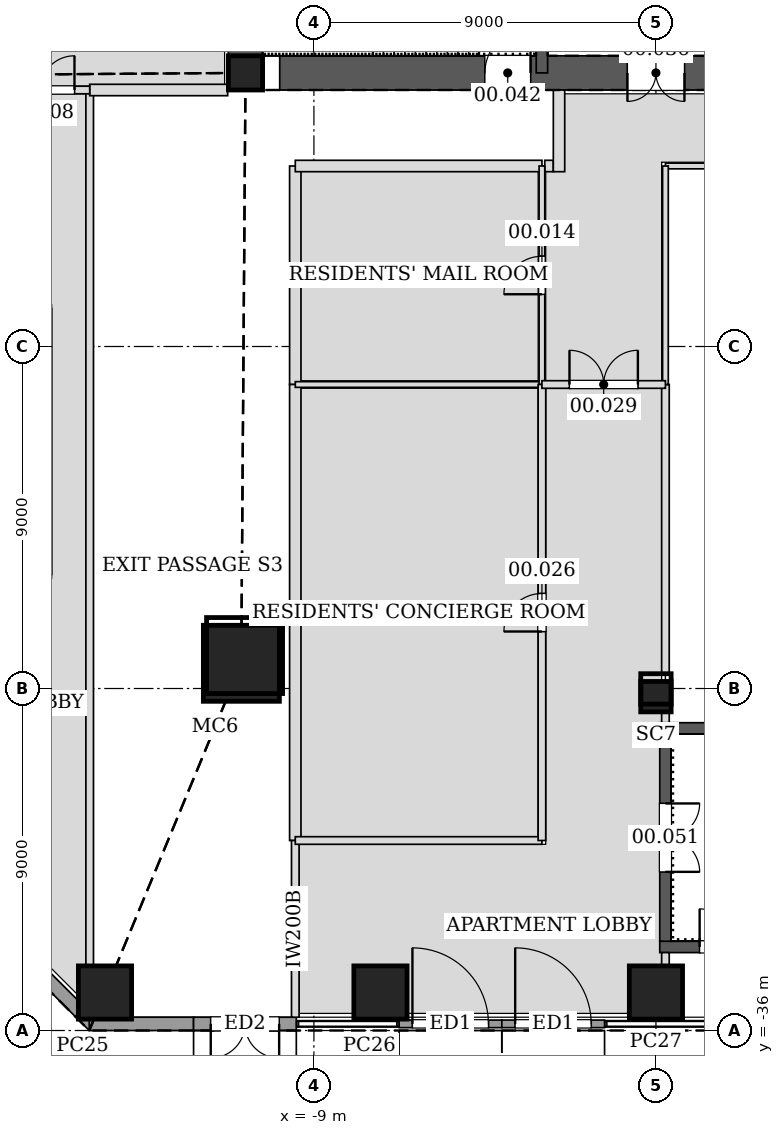
"""IFC4 building model, lengths in metres.
Left out: names, types, materials, properties, quantities, classifications, styles, units other than length and angle.
Written with IfcOpenShell. Run it as: python <this file> out.ifc"""

import sys

from ifc_helpers import new_model, si_unit, direction, frame, frame_2d, origin, origin_2d, place, context, subcontext, project, spatial, rectangle, hollow_rectangle, extrude, element, fill, save


model = new_model("IFC4")
c1 = context("Model", 3, precision=1e-05, world=origin(), true_north=direction((0.0, 1.0)))
c2 = subcontext(c1, "Body", "Model", "MODEL_VIEW")
j1 = project(units=[si_unit("LENGTHUNIT", "METRE"), si_unit("PLANEANGLEUNIT", "RADIAN")], contexts=[c1])
p1 = place(None, origin())
s1 = spatial("IfcSite", under=j1, at=p1, CompositionType="ELEMENT")
p2 = place(p1, origin())
s2 = spatial("IfcBuilding", under=s1, at=p2, CompositionType="ELEMENT")
p3 = place(p2, origin())
s3 = spatial("IfcBuildingStorey", under=s2, at=p3, CompositionType="ELEMENT", Elevation=0.0)
p4 = place(p3, frame((-10.909, -26.336, 0.0), z_axis=(0.011726897842, 0.028266568786, 0.999531630793), x_axis=(-0.923665637433, 0.383199413132, 0.0)))
e1 = element("IfcColumn", 1, at=p4, inside=s3, PredefinedType="COLUMN", context=c2, shape_type="SweptSolid", body=[
    extrude(hollow_rectangle(XDim=2.0, YDim=2.0, WallThickness=0.09, at=origin_2d()), origin(), (0.0, 0.0, 1.0), 7.203),
])
p5 = place(p3, frame((0.0, -27.215, 0.0), z_axis=(0.0, 0.028268512598, 0.999600365744), x_axis=(-1.0, 0.0, 0.0)))
e2 = element("IfcColumn", 2, at=p5, inside=s3, PredefinedType="COLUMN", context=c2, shape_type="SweptSolid", body=[
    extrude(hollow_rectangle(XDim=0.8, YDim=0.8, WallThickness=0.05, at=origin_2d()), origin(), (0.0, 0.0, 1.0), 7.203),
])
for number, where, z_axis, x_axis in (
    (3, (-14.498, -35.0, 0.0), (0.0, 0.0, 1.0), (1.0, 0.0, 0.0)),
    (4, (-7.249, -35.0, 0.0), (0.0, 0.0, 1.0), (1.0, 0.0, 0.0)),
    (5, (0.0, -35.0, 0.0), (0.0, 0.0, 1.0), (1.0, 0.0, 0.0)),
):
    element("IfcColumn", number, at=place(p3, frame(where, z_axis=z_axis, x_axis=x_axis)), inside=s3, PredefinedType="COLUMN", context=c2, shape_type="SweptSolid", body=[
        extrude(rectangle(XDim=1.4, YDim=1.4, at=origin_2d()), origin(), (0.0, 0.0, 1.0), 7.2),
    ])
p6 = place(p3, frame((-10.8, -10.8, 0.0), z_axis=(0.0, 0.0, 1.0), x_axis=(1.0, 0.0, 0.0)))
e6 = element("IfcColumn", 6, at=p6, inside=s3, PredefinedType="COLUMN", context=c2, shape_type="SweptSolid", body=[
    extrude(hollow_rectangle(XDim=0.9, YDim=0.9, WallThickness=0.06, at=origin_2d()), origin(), (0.0, 0.0, 1.0), 7.2),
])
p7 = place(p3, frame((-10.8, -10.8, 0.0), z_axis=(0.0, 0.0, 1.0), x_axis=(1.0, 0.0, 0.0)))
e7 = element("IfcWall", 7, at=p7, inside=s3, PredefinedType="SOLIDWALL", context=c2, shape_type="SweptSolid", body=[
    extrude(rectangle(XDim=21.6, YDim=0.9, at=frame_2d((10.8, 0.0))), origin(), (0.0, 0.0, 1.0), 7.2),
])
p8 = place(p7, frame((10.05, 0.0, 0.0)))
e8 = element("IfcOpeningElement", 8, at=p8, cuts=e7, PredefinedType="OPENING", context=c2, shape_type="SweptSolid", body=[
    extrude(rectangle(XDim=1.5, YDim=2.1, at=frame_2d((0.75, 1.05))), frame((0.0, 0.46, 0.0), z_axis=(0.0, -1.0, 0.0), x_axis=(1.0, 0.0, 0.0)), (0.0, 0.0, 1.0), 0.92),
])
p9 = place(p7, frame((6.3, 0.0, 0.0)))
e9 = element("IfcOpeningElement", 9, at=p9, cuts=e7, PredefinedType="OPENING", context=c2, shape_type="SweptSolid", body=[
    extrude(rectangle(XDim=1.2, YDim=2.1, at=frame_2d((0.6, 1.05))), frame((0.0, 0.46, 0.0), z_axis=(0.0, -1.0, 0.0), x_axis=(1.0, 0.0, 0.0)), (0.0, 0.0, 1.0), 0.92),
])
p10 = place(p7, frame((17.1, 0.0, 0.0)))
e10 = element("IfcOpeningElement", 10, at=p10, cuts=e7, PredefinedType="OPENING", context=c2, shape_type="SweptSolid", body=[
    extrude(rectangle(XDim=0.9, YDim=2.1, at=frame_2d((0.45, 1.05))), frame((0.0, 0.46, 0.0), z_axis=(0.0, -1.0, 0.0), x_axis=(1.0, 0.0, 0.0)), (0.0, 0.0, 1.0), 0.92),
])
p11 = place(p3, frame((-10.8, 10.8, 0.0), z_axis=(0.0, 0.0, 1.0), x_axis=(0.0, -1.0, 0.0)))
e11 = element("IfcWall", 11, at=p11, inside=s3, PredefinedType="SOLIDWALL", context=c2, shape_type="SweptSolid", body=[
    extrude(rectangle(XDim=21.6, YDim=0.9, at=frame_2d((10.8, 0.0))), origin(), (0.0, 0.0, 1.0), 7.2),
])
p12 = place(p11, frame((8.7, 0.0, 0.0)))
e12 = element("IfcOpeningElement", 12, at=p12, cuts=e11, PredefinedType="OPENING", context=c2, shape_type="SweptSolid", body=[
    extrude(rectangle(XDim=1.2, YDim=2.1, at=frame_2d((0.6, 1.05))), frame((0.0, 0.46, 0.0), z_axis=(0.0, -1.0, 0.0), x_axis=(1.0, 0.0, 0.0)), (0.0, 0.0, 1.0), 0.92),
])
p13 = place(p11, frame((11.7, 0.0, 0.0)))
e13 = element("IfcOpeningElement", 13, at=p13, cuts=e11, PredefinedType="OPENING", context=c2, shape_type="SweptSolid", body=[
    extrude(rectangle(XDim=1.2, YDim=2.1, at=frame_2d((0.6, 1.05))), frame((0.0, 0.46, 0.0), z_axis=(0.0, -1.0, 0.0), x_axis=(1.0, 0.0, 0.0)), (0.0, 0.0, 1.0), 0.92),
])
p14 = place(p3, frame((-3.0, -6.0, 0.0), z_axis=(0.0, 0.0, 1.0), x_axis=(0.0, -1.0, 0.0)))
e14 = element("IfcWall", 14, at=p14, inside=s3, PredefinedType="SOLIDWALL", context=c2, shape_type="SweptSolid", body=[
    extrude(rectangle(XDim=4.8, YDim=0.3, at=frame_2d((2.4, 0.0))), origin(), (0.0, 0.0, 1.0), 7.2),
])
p15 = place(p14, frame((1.65, 0.0, 0.0)))
e15 = element("IfcOpeningElement", 15, at=p15, cuts=e14, PredefinedType="OPENING", context=c2, shape_type="SweptSolid", body=[
    extrude(rectangle(XDim=1.2, YDim=2.1, at=frame_2d((0.6, 1.05))), frame((0.0, 0.16, 0.0), z_axis=(0.0, -1.0, 0.0), x_axis=(1.0, 0.0, 0.0)), (0.0, 0.0, 1.0), 0.32),
])
p16 = place(p3, frame((0.1, -33.8, 0.0), z_axis=(0.0, 0.0, 1.0), x_axis=(1.0, 0.0, 0.0)))
e16 = element("IfcWall", 16, at=p16, inside=s3, PredefinedType="SOLIDWALL", context=c2, shape_type="SweptSolid", body=[
    extrude(rectangle(XDim=10.2, YDim=0.3, at=frame_2d((5.1, 0.0))), origin(), (0.0, 0.0, 1.0), 7.2),
])
p17 = place(p16, frame((1.05, 0.0, 0.0)))
e17 = element("IfcOpeningElement", 17, at=p17, cuts=e16, PredefinedType="OPENING", context=c2, shape_type="SweptSolid", body=[
    extrude(rectangle(XDim=1.0, YDim=2.1, at=frame_2d((0.5, 1.05))), frame((0.0, 0.16, 0.0), z_axis=(0.0, -1.0, 0.0), x_axis=(1.0, 0.0, 0.0)), (0.0, 0.0, 1.0), 0.32),
])
p18 = place(p3, frame((10.3, -28.05, 0.0), z_axis=(0.0, 0.0, 1.0), x_axis=(-1.0, 0.0, 0.0)))
e18 = element("IfcWall", 18, at=p18, inside=s3, PredefinedType="SOLIDWALL", context=c2, shape_type="SweptSolid", body=[
    extrude(rectangle(XDim=10.2, YDim=0.3, at=frame_2d((5.1, 0.0))), origin(), (0.0, 0.0, 1.0), 7.2),
])
p19 = place(p3, frame((0.25, -28.2, 0.0), z_axis=(0.0, 0.0, 1.0), x_axis=(0.0, -1.0, 0.0)))
e19 = element("IfcWall", 19, at=p19, inside=s3, PredefinedType="SOLIDWALL", context=c2, shape_type="SweptSolid", body=[
    extrude(rectangle(XDim=5.45, YDim=0.3, at=frame_2d((2.725, 0.0))), origin(), (0.0, 0.0, 1.0), 7.2),
])
p20 = place(p19, frame((1.825, 0.0, 0.0)))
e20 = element("IfcOpeningElement", 20, at=p20, cuts=e19, PredefinedType="OPENING", context=c2, shape_type="SweptSolid", body=[
    extrude(rectangle(XDim=1.8, YDim=2.1, at=frame_2d((0.9, 1.05))), frame((0.0, 0.16, 0.0), z_axis=(0.0, -1.0, 0.0), x_axis=(1.0, 0.0, 0.0)), (0.0, 0.0, 1.0), 0.32),
])
for number, where, z_axis, x_axis in (
    (21, (-16.729, -33.935, 0.0), (0.0, 0.0, 1.0), (0.707, -0.707, 0.0)),
    (22, (-14.912, -35.825, 0.0), (0.0, 0.0, 1.0), (1.0, 0.0, 0.0)),
):
    element("IfcWall", number, at=place(p3, frame(where, z_axis=z_axis, x_axis=x_axis)), inside=s3, PredefinedType="SOLIDWALL", context=c2, shape_type="SweptSolid", body=[
        extrude(rectangle(XDim=2.745, YDim=0.35, at=frame_2d((1.373, 0.0))), origin(), (0.0, 0.0, 1.0), 6.9),
    ])
p21 = place(p3, frame((-12.167, -35.825, 0.0), z_axis=(0.0, 0.0, 1.0), x_axis=(1.0, 0.0, 0.0)))
e23 = element("IfcWall", 23, at=p21, inside=s3, PredefinedType="SOLIDWALL", context=c2, shape_type="SweptSolid", body=[
    extrude(rectangle(XDim=2.704, YDim=0.35, at=frame_2d((1.352, 0.0))), origin(), (0.0, 0.0, 1.0), 6.9),
])
p22 = place(p21, frame((0.452, 0.0, 0.0)))
e24 = element("IfcOpeningElement", 24, at=p22, cuts=e23, PredefinedType="OPENING", context=c2, shape_type="SweptSolid", body=[
    extrude(rectangle(XDim=1.8, YDim=2.4, at=frame_2d((0.9, 1.2))), frame((0.0, 0.185, 0.0), z_axis=(0.0, -1.0, 0.0), x_axis=(1.0, 0.0, 0.0)), (0.0, 0.0, 1.0), 0.37),
])
p23 = place(p3, frame((-6.759, -35.825, 0.0), z_axis=(0.0, 0.0, 1.0), x_axis=(1.0, 0.0, 0.0)))
e25 = element("IfcWall", 25, at=p23, inside=s3, PredefinedType="SOLIDWALL", context=c2, shape_type="SweptSolid", body=[
    extrude(rectangle(XDim=2.704, YDim=0.2, at=frame_2d((1.352, 0.0))), origin(), (0.0, 0.0, 1.0), 6.9),
])
p24 = place(p23, frame((0.352, 0.0, 0.0)))
e26 = element("IfcOpeningElement", 26, at=p24, cuts=e25, PredefinedType="OPENING", context=c2, shape_type="SweptSolid", body=[
    extrude(rectangle(XDim=2.0, YDim=3.0, at=frame_2d((1.0, 1.5))), frame((0.0, 0.11, 0.0), z_axis=(0.0, -1.0, 0.0), x_axis=(1.0, 0.0, 0.0)), (0.0, 0.0, 1.0), 0.22),
])
p25 = place(p3, frame((-4.055, -35.825, 0.0), z_axis=(0.0, 0.0, 1.0), x_axis=(1.0, 0.0, 0.0)))
e27 = element("IfcWall", 27, at=p25, inside=s3, PredefinedType="SOLIDWALL", context=c2, shape_type="SweptSolid", body=[
    extrude(rectangle(XDim=2.704, YDim=0.2, at=frame_2d((1.352, 0.0))), origin(), (0.0, 0.0, 1.0), 6.9),
])
p26 = place(p25, frame((0.352, 0.0, 0.0)))
e28 = element("IfcOpeningElement", 28, at=p26, cuts=e27, PredefinedType="OPENING", context=c2, shape_type="SweptSolid", body=[
    extrude(rectangle(XDim=2.0, YDim=3.0, at=frame_2d((1.0, 1.5))), frame((0.0, 0.11, 0.0), z_axis=(0.0, -1.0, 0.0), x_axis=(1.0, 0.0, 0.0)), (0.0, 0.0, 1.0), 0.22),
])
p27 = place(p3, frame((-14.9, -11.25, 0.0), z_axis=(0.0, 0.0, 1.0), x_axis=(0.0, -1.0, 0.0)))
e29 = element("IfcWall", 29, at=p27, inside=s3, PredefinedType="PARTITIONING", context=c2, shape_type="SweptSolid", body=[
    extrude(rectangle(XDim=23.031, YDim=0.2, at=frame_2d((11.516, 0.0))), origin(), (0.0, 0.0, 1.0), 5.79),
])
p28 = place(p3, frame((-9.49, -19.001, 0.0), z_axis=(0.0, 0.0, 1.0), x_axis=(0.0, 1.0, 0.0)))
e30 = element("IfcWall", 30, at=p28, inside=s3, PredefinedType="PARTITIONING", context=c2, shape_type="SweptSolid", body=[
    extrude(rectangle(XDim=5.751, YDim=0.3, at=frame_2d((2.875, 0.0))), origin(), (0.0, 0.0, 1.0), 6.212),
])
p29 = place(p3, frame((-9.49, -13.25, 0.0), z_axis=(0.0, 0.0, 1.0), x_axis=(1.0, 0.0, 0.0)))
e31 = element("IfcWall", 31, at=p29, inside=s3, PredefinedType="PARTITIONING", context=c2, shape_type="SweptSolid", body=[
    extrude(rectangle(XDim=6.491, YDim=0.3, at=frame_2d((3.246, 0.0))), origin(), (0.0, 0.0, 1.0), 6.212),
])
p30 = place(p3, frame((-9.49, -31.001, 0.0), z_axis=(0.0, 0.0, 1.0), x_axis=(0.0, 1.0, 0.0)))
e32 = element("IfcWall", 32, at=p30, inside=s3, PredefinedType="PARTITIONING", context=c2, shape_type="SweptSolid", body=[
    extrude(rectangle(XDim=12.002, YDim=0.3, at=frame_2d((6.001, 0.0))), origin(), (0.0, 0.0, 1.0), 5.879),
])
p31 = place(p3, frame((-9.49, -35.65, 0.0), z_axis=(0.0, 0.0, 1.0), x_axis=(0.0, 1.0, 0.0)))
e33 = element("IfcWall", 33, at=p31, inside=s3, PredefinedType="PARTITIONING", context=c2, shape_type="SweptSolid", body=[
    extrude(rectangle(XDim=4.651, YDim=0.2, at=frame_2d((2.325, 0.0))), origin(), (0.0, 0.0, 1.0), 6.288),
])
p32 = place(p3, frame((-11.269, -11.25, 0.0), z_axis=(0.0, 0.0, 1.0), x_axis=(-1.0, 0.0, 0.0)))
e34 = element("IfcWall", 34, at=p32, inside=s3, PredefinedType="PARTITIONING", context=c2, shape_type="SweptSolid", body=[
    extrude(rectangle(XDim=3.631, YDim=0.3, at=frame_2d((1.815, 0.0))), origin(), (0.0, 0.0, 1.0), 5.59),
])
p33 = place(p3, frame((-2.925, -13.25, 0.0), z_axis=(0.0, 0.0, 1.0), x_axis=(1.0, 0.0, 0.0)))
e35 = element("IfcWall", 35, at=p33, inside=s3, PredefinedType="PARTITIONING", context=c2, shape_type="SweptSolid", body=[
    extrude(rectangle(XDim=0.225, YDim=0.3, at=frame_2d((0.113, 0.0))), origin(), (0.0, 0.0, 1.0), 6.212),
])
p34 = place(p3, frame((-2.55, -13.4, 0.0), z_axis=(0.0, 0.0, 1.0), x_axis=(0.0, 1.0, 0.0)))
e36 = element("IfcWall", 36, at=p34, inside=s3, PredefinedType="PARTITIONING", context=c2, shape_type="SweptSolid", body=[
    extrude(rectangle(XDim=2.15, YDim=0.3, at=frame_2d((1.075, 0.0))), origin(), (0.0, 0.0, 1.0), 6.9),
])
p35 = place(p3, frame((0.25, -33.949, 0.0), z_axis=(0.0, 0.0, 1.0), x_axis=(0.0, -1.0, 0.0)))
e37 = element("IfcWall", 37, at=p35, inside=s3, PredefinedType="PARTITIONING", context=c2, shape_type="SweptSolid", body=[
    extrude(rectangle(XDim=0.332, YDim=0.2, at=frame_2d((0.166, 0.0))), origin(), (0.0, 0.0, 1.0), 6.534),
])
p36 = place(p3, frame((-14.9, -11.25, 0.0), z_axis=(0.0, 0.0, 1.0), x_axis=(-1.0, 0.0, 0.0)))
e38 = element("IfcWall", 38, at=p36, inside=s3, PredefinedType="PARTITIONING", context=c2, shape_type="SweptSolid", body=[
    extrude(rectangle(XDim=2.601, YDim=0.2, at=frame_2d((1.301, 0.0))), origin(), (0.0, 0.0, 1.0), 6.9),
])
p37 = place(p36, frame((0.4, 0.0, 0.0)))
e39 = element("IfcOpeningElement", 39, at=p37, cuts=e38, PredefinedType="OPENING", context=c2, shape_type="SweptSolid", body=[
    extrude(rectangle(XDim=1.8, YDim=2.4, at=frame_2d((0.9, 1.2))), frame((0.0, 0.11, 0.0), z_axis=(0.0, -1.0, 0.0), x_axis=(1.0, 0.0, 0.0)), (0.0, 0.0, 1.0), 0.22),
])
p38 = place(p3, frame((-9.49, -19.0, 0.0), z_axis=(0.0, 0.0, 1.0), x_axis=(1.0, 0.0, 0.0)))
e40 = element("IfcWall", 40, at=p38, inside=s3, PredefinedType="PARTITIONING", context=c2, shape_type="SweptSolid", body=[
    extrude(rectangle(XDim=6.49, YDim=0.15, at=frame_2d((3.245, 0.0))), origin(), (0.0, 0.0, 1.0), 6.283),
])
p39 = place(p3, frame((-3.0, -19.0, 0.0), z_axis=(0.0, 0.0, 1.0), x_axis=(0.0, 1.0, 0.0)))
e41 = element("IfcWall", 41, at=p39, inside=s3, PredefinedType="PARTITIONING", context=c2, shape_type="SweptSolid", body=[
    extrude(rectangle(XDim=5.75, YDim=0.15, at=frame_2d((2.875, 0.0))), origin(), (0.0, 0.0, 1.0), 6.212),
])
p40 = place(p39, frame((2.375, 0.0, 0.0)))
e42 = element("IfcOpeningElement", 42, at=p40, cuts=e41, PredefinedType="OPENING", context=c2, shape_type="SweptSolid", body=[
    extrude(rectangle(XDim=1.0, YDim=2.1, at=frame_2d((0.5, 1.05))), frame((0.0, 0.085, 0.0), z_axis=(0.0, -1.0, 0.0), x_axis=(1.0, 0.0, 0.0)), (0.0, 0.0, 1.0), 0.17),
])
p41 = place(p3, frame((0.25, -18.999, 0.0), z_axis=(0.0, 0.0, 1.0), x_axis=(0.0, -1.0, 0.0)))
e43 = element("IfcWall", 43, at=p41, inside=s3, PredefinedType="PARTITIONING", context=c2, shape_type="SweptSolid", body=[
    extrude(rectangle(XDim=7.593, YDim=0.2, at=frame_2d((3.796, 0.0))), origin(), (0.0, 0.0, 1.0), 5.59),
])
p42 = place(p3, frame((0.25, -27.634, 0.0), z_axis=(0.0, 0.0, 1.0), x_axis=(0.0, -1.0, 0.0)))
e44 = element("IfcWall", 44, at=p42, inside=s3, PredefinedType="PARTITIONING", context=c2, shape_type="SweptSolid", body=[
    extrude(rectangle(XDim=0.267, YDim=0.2, at=frame_2d((0.133, 0.0))), origin(), (0.0, 0.0, 1.0), 6.534),
])
p43 = place(p3, frame((0.25, -13.25, 0.0), z_axis=(0.0, 0.0, 1.0), x_axis=(1.0, 0.0, 0.0)))
e45 = element("IfcWall", 45, at=p43, inside=s3, PredefinedType="PARTITIONING", context=c2, shape_type="SweptSolid", body=[
    extrude(rectangle(XDim=14.25, YDim=0.15, at=frame_2d((7.125, 0.0))), origin(), (0.0, 0.0, 1.0), 5.59),
])
p44 = place(p43, frame((3.45, 0.0, 0.0)))
e46 = element("IfcOpeningElement", 46, at=p44, cuts=e45, PredefinedType="OPENING", context=c2, shape_type="SweptSolid", body=[
    extrude(rectangle(XDim=1.8, YDim=2.4, at=frame_2d((0.9, 1.2))), frame((0.0, 0.085, 0.0), z_axis=(0.0, -1.0, 0.0), x_axis=(1.0, 0.0, 0.0)), (0.0, 0.0, 1.0), 0.17),
])
p45 = place(p3, frame((0.25, -13.25, 0.0), z_axis=(0.0, 0.0, 1.0), x_axis=(0.0, -1.0, 0.0)))
e47 = element("IfcWall", 47, at=p45, inside=s3, PredefinedType="PARTITIONING", context=c2, shape_type="SweptSolid", body=[
    extrude(rectangle(XDim=5.751, YDim=0.15, at=frame_2d((2.875, 0.0))), origin(), (0.0, 0.0, 1.0), 5.59),
])
p46 = place(p3, frame((-9.49, -31.0, 0.0), z_axis=(0.0, 0.0, 1.0), x_axis=(1.0, 0.0, 0.0)))
e48 = element("IfcWall", 48, at=p46, inside=s3, PredefinedType="PARTITIONING", context=c2, shape_type="SweptSolid", body=[
    extrude(rectangle(XDim=6.49, YDim=0.2, at=frame_2d((3.245, 0.0))), origin(), (0.0, 0.0, 1.0), 5.963),
])
p47 = place(p3, frame((-3.0, -31.0, 0.0), z_axis=(0.0, 0.0, 1.0), x_axis=(0.0, 1.0, 0.0)))
e49 = element("IfcWall", 49, at=p47, inside=s3, PredefinedType="PARTITIONING", context=c2, shape_type="SweptSolid", body=[
    extrude(rectangle(XDim=12.0, YDim=0.2, at=frame_2d((6.0, 0.0))), origin(), (0.0, 0.0, 1.0), 5.879),
])
p48 = place(p47, frame((5.5, 0.0, 0.0)))
e50 = element("IfcOpeningElement", 50, at=p48, cuts=e49, PredefinedType="OPENING", context=c2, shape_type="SweptSolid", body=[
    extrude(rectangle(XDim=1.0, YDim=2.1, at=frame_2d((0.5, 1.05))), frame((0.0, 0.11, 0.0), z_axis=(0.0, -1.0, 0.0), x_axis=(1.0, 0.0, 0.0)), (0.0, 0.0, 1.0), 0.22),
])
p49 = place(p3, frame((0.25, -19.0, 0.0), z_axis=(0.0, 0.0, 1.0), x_axis=(-1.0, 0.0, 0.0)))
e51 = element("IfcWall", 51, at=p49, inside=s3, PredefinedType="PARTITIONING", context=c2, shape_type="SweptSolid", body=[
    extrude(rectangle(XDim=3.25, YDim=0.2, at=frame_2d((1.625, 0.0))), origin(), (0.0, 0.0, 1.0), 5.59),
])
p50 = place(p49, frame((0.725, 0.0, 0.0)))
e52 = element("IfcOpeningElement", 52, at=p50, cuts=e51, PredefinedType="OPENING", context=c2, shape_type="SweptSolid", body=[
    extrude(rectangle(XDim=1.8, YDim=2.4, at=frame_2d((0.9, 1.2))), frame((0.0, 0.11, 0.0), z_axis=(0.0, -1.0, 0.0), x_axis=(1.0, 0.0, 0.0)), (0.0, 0.0, 1.0), 0.22),
])
p51 = place(p22, frame((1.8, 0.0, 0.0), z_axis=(0.0, 0.0, 1.0), x_axis=(-1.0, 0.0, 0.0)))
e53 = element("IfcDoor", 53, at=p51, inside=s3, OperationType="DOUBLE_DOOR_SINGLE_SWING", PredefinedType="DOOR", context=c2, shape_type="SweptSolid", body=[
    extrude(rectangle(XDim=1.8, YDim=2.4, at=frame_2d((0.9, 1.2))), frame((0.0, 0.025, 0.0), z_axis=(0.0, -1.0, 0.0), x_axis=(1.0, 0.0, 0.0)), (0.0, 0.0, 1.0), 0.05),
])
fill(e24, e53)
p52 = place(p24, origin())
e54 = element("IfcDoor", 54, at=p52, inside=s3, OperationType="SINGLE_SWING_LEFT", PredefinedType="DOOR", context=c2, shape_type="SweptSolid", body=[
    extrude(rectangle(XDim=2.0, YDim=3.0, at=frame_2d((1.0, 1.5))), frame((0.0, 0.025, 0.0), z_axis=(0.0, -1.0, 0.0), x_axis=(1.0, 0.0, 0.0)), (0.0, 0.0, 1.0), 0.05),
])
fill(e26, e54)
p53 = place(p26, origin())
e55 = element("IfcDoor", 55, at=p53, inside=s3, OperationType="SINGLE_SWING_LEFT", PredefinedType="DOOR", context=c2, shape_type="SweptSolid", body=[
    extrude(rectangle(XDim=2.0, YDim=3.0, at=frame_2d((1.0, 1.5))), frame((0.0, 0.025, 0.0), z_axis=(0.0, -1.0, 0.0), x_axis=(1.0, 0.0, 0.0)), (0.0, 0.0, 1.0), 0.05),
])
fill(e28, e55)
p54 = place(p37, frame((1.8, 0.0, 0.0), z_axis=(0.0, 0.0, 1.0), x_axis=(-1.0, 0.0, 0.0)))
e56 = element("IfcDoor", 56, at=p54, inside=s3, OperationType="DOUBLE_DOOR_SINGLE_SWING", PredefinedType="DOOR", context=c2, shape_type="SweptSolid", body=[
    extrude(rectangle(XDim=1.8, YDim=2.4, at=frame_2d((0.9, 1.2))), frame((0.0, 0.025, 0.0), z_axis=(0.0, -1.0, 0.0), x_axis=(1.0, 0.0, 0.0)), (0.0, 0.0, 1.0), 0.05),
])
fill(e39, e56)
p55 = place(p40, origin())
e57 = element("IfcDoor", 57, at=p55, inside=s3, OperationType="SINGLE_SWING_LEFT", PredefinedType="DOOR", context=c2, shape_type="SweptSolid", body=[
    extrude(rectangle(XDim=1.0, YDim=2.1, at=frame_2d((0.5, 1.05))), frame((0.0, 0.025, 0.0), z_axis=(0.0, -1.0, 0.0), x_axis=(1.0, 0.0, 0.0)), (0.0, 0.0, 1.0), 0.05),
])
fill(e42, e57)
p56 = place(p48, origin())
e58 = element("IfcDoor", 58, at=p56, inside=s3, OperationType="SINGLE_SWING_LEFT", PredefinedType="DOOR", context=c2, shape_type="SweptSolid", body=[
    extrude(rectangle(XDim=1.0, YDim=2.1, at=frame_2d((0.5, 1.05))), frame((0.0, 0.025, 0.0), z_axis=(0.0, -1.0, 0.0), x_axis=(1.0, 0.0, 0.0)), (0.0, 0.0, 1.0), 0.05),
])
fill(e50, e58)
p57 = place(p50, frame((1.8, 0.0, 0.0), z_axis=(0.0, 0.0, 1.0), x_axis=(-1.0, 0.0, 0.0)))
e59 = element("IfcDoor", 59, at=p57, inside=s3, OperationType="DOUBLE_DOOR_SINGLE_SWING", PredefinedType="DOOR", context=c2, shape_type="SweptSolid", body=[
    extrude(rectangle(XDim=1.8, YDim=2.4, at=frame_2d((0.9, 1.2))), frame((0.0, 0.025, 0.0), z_axis=(0.0, -1.0, 0.0), x_axis=(1.0, 0.0, 0.0)), (0.0, 0.0, 1.0), 0.05),
])
fill(e52, e59)
p58 = place(p8, frame((1.5, 0.0, 0.0), z_axis=(0.0, 0.0, 1.0), x_axis=(-1.0, 0.0, 0.0)))
e60 = element("IfcDoor", 60, at=p58, inside=s3, OperationType="DOUBLE_DOOR_SINGLE_SWING", PredefinedType="DOOR", context=c2, shape_type="SweptSolid", body=[
    extrude(rectangle(XDim=1.5, YDim=2.1, at=frame_2d((0.75, 1.05))), frame((0.0, 0.025, 0.0), z_axis=(0.0, -1.0, 0.0), x_axis=(1.0, 0.0, 0.0)), (0.0, 0.0, 1.0), 0.05),
])
fill(e8, e60)
p59 = place(p9, origin())
e61 = element("IfcDoor", 61, at=p59, inside=s3, OperationType="SINGLE_SWING_RIGHT", PredefinedType="DOOR", context=c2, shape_type="SweptSolid", body=[
    extrude(rectangle(XDim=1.2, YDim=2.1, at=frame_2d((0.6, 1.05))), frame((0.0, 0.025, 0.0), z_axis=(0.0, -1.0, 0.0), x_axis=(1.0, 0.0, 0.0)), (0.0, 0.0, 1.0), 0.05),
])
fill(e9, e61)
p60 = place(p20, origin())
e62 = element("IfcDoor", 62, at=p60, inside=s3, OperationType="DOUBLE_DOOR_SINGLE_SWING", PredefinedType="DOOR", context=c2, shape_type="SweptSolid", body=[
    extrude(rectangle(XDim=1.8, YDim=2.1, at=frame_2d((0.9, 1.05))), frame((0.0, 0.025, 0.0), z_axis=(0.0, -1.0, 0.0), x_axis=(1.0, 0.0, 0.0)), (0.0, 0.0, 1.0), 0.05),
])
fill(e20, e62)
p61 = place(p17, origin())
e63 = element("IfcDoor", 63, at=p61, inside=s3, OperationType="SINGLE_SWING_LEFT", PredefinedType="DOOR", context=c2, shape_type="SweptSolid", body=[
    extrude(rectangle(XDim=1.0, YDim=2.1, at=frame_2d((0.5, 1.05))), frame((0.0, 0.025, 0.0), z_axis=(0.0, -1.0, 0.0), x_axis=(1.0, 0.0, 0.0)), (0.0, 0.0, 1.0), 0.05),
])
fill(e17, e63)
save(model, sys.argv[1])
